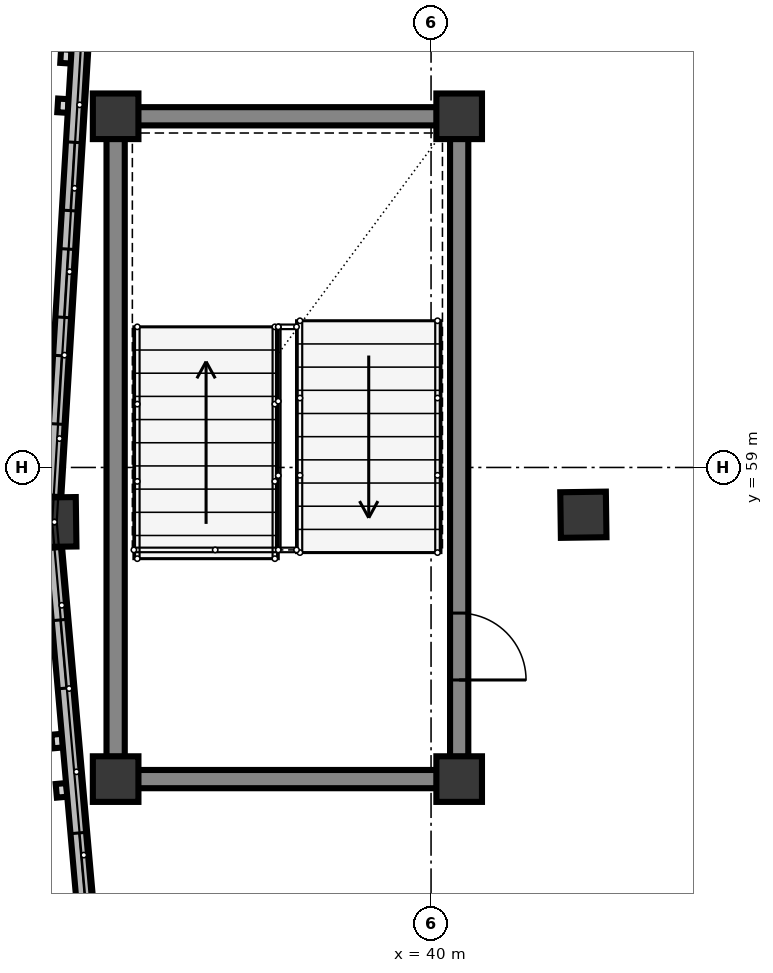
"""IFC4 building model, lengths in metres.
Left out: names, types, materials, properties, quantities, classifications, styles, units other than length and angle.
Written with IfcOpenShell. Run it as: python <this file> out.ifc"""

import sys

from ifc_helpers import new_model, si_unit, direction, frame, frame_2d, origin, origin_2d, place, context, subcontext, project, spatial, rectangle, extrude, element, fill, save


model = new_model("IFC4")
c1 = context("Model", 3, precision=1e-05, world=origin(), true_north=direction((0.0, 1.0)))
c2 = subcontext(c1, "Body", "Model", "MODEL_VIEW")
j1 = project(units=[si_unit("LENGTHUNIT", "METRE"), si_unit("PLANEANGLEUNIT", "RADIAN")], contexts=[c1])
p1 = place(None, origin())
s1 = spatial("IfcSite", under=j1, at=p1, CompositionType="ELEMENT")
p2 = place(p1, origin())
s2 = spatial("IfcBuilding", under=s1, at=p2, CompositionType="ELEMENT")
p3 = place(p2, frame((0.0, 0.0, 4.5)))
s3 = spatial("IfcBuildingStorey", under=s2, at=p3, CompositionType="ELEMENT", Elevation=4.5)
for number, where, z_axis, x_axis in (
    (1, (35.85, 54.9, 0.0), (0.0, 0.0, 1.0), (1.0, 0.0, 0.0)),
    (2, (40.37, 54.9, 0.0), (0.0, 0.0, 1.0), (1.0, 0.0, 0.0)),
    (3, (40.37, 63.62, 0.0), (0.0, 0.0, 1.0), (1.0, 0.0, 0.0)),
    (4, (35.85, 63.62, 0.0), (0.0, 0.0, 1.0), (1.0, 0.0, 0.0)),
    (5, (42.004, 58.378, 0.0), (0.0, 0.0, 1.0), (-1.0, -0.014, 0.0)),
):
    element("IfcColumn", number, at=place(p3, frame(where, z_axis=z_axis, x_axis=x_axis)), inside=s3, PredefinedType="COLUMN", context=c2, shape_type="SweptSolid", body=[
        extrude(rectangle(XDim=0.6, YDim=0.6, at=origin_2d()), origin(), (0.0, 0.0, 1.0), 4.0),
    ])
p4 = place(p3, frame((35.005, 58.281, 0.0), z_axis=(0.0, 0.0, 1.0), x_axis=(-0.999904463751, -0.013822567474, 0.0)))
e6 = element("IfcColumn", 6, at=p4, inside=s3, PredefinedType="COLUMN", context=c2, shape_type="SweptSolid", body=[
    extrude(rectangle(XDim=0.65, YDim=0.65, at=origin_2d()), origin(), (0.0, 0.0, 1.0), 4.0),
])
p5 = place(p3, frame((35.025, 58.616, 0.0), z_axis=(0.0, 0.0, 1.0), x_axis=(0.06029906372, 0.998180355905, 0.0)))
e7 = element("IfcWall", 7, at=p5, inside=s3, PredefinedType="SOLIDWALL", context=c2, shape_type="SweptSolid", body=[
    extrude(rectangle(XDim=7.033, YDim=0.22, at=frame_2d((3.516, 0.0))), origin(), (0.0, 0.0, 1.0), 3.172),
])
p6 = place(p5, frame((0.957, 0.0, 0.85)))
e8 = element("IfcOpeningElement", 8, at=p6, cuts=e7, PredefinedType="OPENING", context=c2, shape_type="SweptSolid", body=[
    extrude(rectangle(XDim=0.9, YDim=1.4, at=frame_2d((0.45, 0.7))), frame((0.0, 0.12, 0.0), z_axis=(0.0, -1.0, 0.0), x_axis=(1.0, 0.0, 0.0)), (0.0, 0.0, 1.0), 0.24),
])
p7 = place(p5, frame((2.363, 0.0, 0.85)))
e9 = element("IfcOpeningElement", 9, at=p7, cuts=e7, PredefinedType="OPENING", context=c2, shape_type="SweptSolid", body=[
    extrude(rectangle(XDim=0.9, YDim=1.4, at=frame_2d((0.45, 0.7))), frame((0.0, 0.12, 0.0), z_axis=(0.0, -1.0, 0.0), x_axis=(1.0, 0.0, 0.0)), (0.0, 0.0, 1.0), 0.24),
])
p8 = place(p5, frame((3.77, 0.0, 0.85)))
e10 = element("IfcOpeningElement", 10, at=p8, cuts=e7, PredefinedType="OPENING", context=c2, shape_type="SweptSolid", body=[
    extrude(rectangle(XDim=0.9, YDim=1.4, at=frame_2d((0.45, 0.7))), frame((0.0, 0.12, 0.0), z_axis=(0.0, -1.0, 0.0), x_axis=(1.0, 0.0, 0.0)), (0.0, 0.0, 1.0), 0.24),
])
p9 = place(p3, frame((35.652, 50.942, 0.0), z_axis=(0.0, 0.0, 1.0), x_axis=(-0.087777274836, 0.996140125696, 0.0)))
e11 = element("IfcWall", 11, at=p9, inside=s3, PredefinedType="SOLIDWALL", context=c2, shape_type="SweptSolid", body=[
    extrude(rectangle(XDim=7.031, YDim=0.22, at=frame_2d((3.516, 0.0))), origin(), (0.0, 0.0, 1.0), 3.172),
])
p10 = place(p9, frame((0.956, 0.0, 0.85)))
e12 = element("IfcOpeningElement", 12, at=p10, cuts=e11, PredefinedType="OPENING", context=c2, shape_type="SweptSolid", body=[
    extrude(rectangle(XDim=0.9, YDim=1.4, at=frame_2d((0.45, 0.7))), frame((0.0, 0.12, 0.0), z_axis=(0.0, -1.0, 0.0), x_axis=(1.0, 0.0, 0.0)), (0.0, 0.0, 1.0), 0.24),
])
p11 = place(p9, frame((2.362, 0.0, 0.85)))
e13 = element("IfcOpeningElement", 13, at=p11, cuts=e11, PredefinedType="OPENING", context=c2, shape_type="SweptSolid", body=[
    extrude(rectangle(XDim=0.9, YDim=1.4, at=frame_2d((0.45, 0.7))), frame((0.0, 0.12, 0.0), z_axis=(0.0, -1.0, 0.0), x_axis=(1.0, 0.0, 0.0)), (0.0, 0.0, 1.0), 0.24),
])
p12 = place(p9, frame((5.175, 0.0, 0.85)))
e14 = element("IfcOpeningElement", 14, at=p12, cuts=e11, PredefinedType="OPENING", context=c2, shape_type="SweptSolid", body=[
    extrude(rectangle(XDim=0.9, YDim=1.4, at=frame_2d((0.45, 0.7))), frame((0.0, 0.12, 0.0), z_axis=(0.0, -1.0, 0.0), x_axis=(1.0, 0.0, 0.0)), (0.0, 0.0, 1.0), 0.24),
])
p13 = place(p3, frame((35.85, 55.192, 0.0), z_axis=(0.0, 0.0, 1.0), x_axis=(0.0, 1.0, 0.0)))
e15 = element("IfcWall", 15, at=p13, inside=s3, PredefinedType="SHEAR", context=c2, shape_type="SweptSolid", body=[
    extrude(rectangle(XDim=8.136, YDim=0.24, at=frame_2d((4.068, 0.0))), origin(), (0.0, 0.0, 1.0), 3.74),
])
p14 = place(p3, frame((40.37, 63.328, 0.0), z_axis=(0.0, 0.0, 1.0), x_axis=(0.0, -1.0, 0.0)))
e16 = element("IfcWall", 16, at=p14, inside=s3, PredefinedType="SHEAR", context=c2, shape_type="SweptSolid", body=[
    extrude(rectangle(XDim=8.136, YDim=0.24, at=frame_2d((4.068, 0.0))), origin(), (0.0, 0.0, 1.0), 3.74),
])
p15 = place(p14, frame((6.244, 0.0, 0.0)))
e17 = element("IfcOpeningElement", 17, at=p15, cuts=e16, PredefinedType="OPENING", context=c2, shape_type="SweptSolid", body=[
    extrude(rectangle(XDim=0.88, YDim=2.1, at=frame_2d((0.44, 1.05))), frame((0.0, 0.13, 0.0), z_axis=(0.0, -1.0, 0.0), x_axis=(1.0, 0.0, 0.0)), (0.0, 0.0, 1.0), 0.26),
])
for number, where, z_axis, x_axis in (
    (18, (40.078, 54.9, 0.0), (0.0, 0.0, 1.0), (-1.0, 0.0, 0.0)),
    (19, (40.078, 63.62, 0.0), (0.0, 0.0, 1.0), (-1.0, 0.0, 0.0)),
):
    element("IfcWall", number, at=place(p3, frame(where, z_axis=z_axis, x_axis=x_axis)), inside=s3, PredefinedType="SHEAR", context=c2, shape_type="SweptSolid", body=[
        extrude(rectangle(XDim=3.936, YDim=0.24, at=frame_2d((1.968, 0.0))), origin(), (0.0, 0.0, 1.0), 3.74),
    ])
p16 = place(p6, origin())
e20 = element("IfcWindow", 20, at=p16, inside=s3, PartitioningType="SINGLE_PANEL", PredefinedType="WINDOW", context=c2, shape_type="SweptSolid", body=[
    extrude(rectangle(XDim=0.9, YDim=1.4, at=frame_2d((0.45, 0.7))), frame((0.0, 0.03, 0.0), z_axis=(0.0, -1.0, 0.0), x_axis=(1.0, 0.0, 0.0)), (0.0, 0.0, 1.0), 0.06),
])
fill(e8, e20)
p17 = place(p7, origin())
e21 = element("IfcWindow", 21, at=p17, inside=s3, PartitioningType="SINGLE_PANEL", PredefinedType="WINDOW", context=c2, shape_type="SweptSolid", body=[
    extrude(rectangle(XDim=0.9, YDim=1.4, at=frame_2d((0.45, 0.7))), frame((0.0, 0.03, 0.0), z_axis=(0.0, -1.0, 0.0), x_axis=(1.0, 0.0, 0.0)), (0.0, 0.0, 1.0), 0.06),
])
fill(e9, e21)
p18 = place(p8, origin())
e22 = element("IfcWindow", 22, at=p18, inside=s3, PartitioningType="SINGLE_PANEL", PredefinedType="WINDOW", context=c2, shape_type="SweptSolid", body=[
    extrude(rectangle(XDim=0.9, YDim=1.4, at=frame_2d((0.45, 0.7))), frame((0.0, 0.03, 0.0), z_axis=(0.0, -1.0, 0.0), x_axis=(1.0, 0.0, 0.0)), (0.0, 0.0, 1.0), 0.06),
])
fill(e10, e22)
p19 = place(p11, origin())
e23 = element("IfcWindow", 23, at=p19, inside=s3, PartitioningType="SINGLE_PANEL", PredefinedType="WINDOW", context=c2, shape_type="SweptSolid", body=[
    extrude(rectangle(XDim=0.9, YDim=1.4, at=frame_2d((0.45, 0.7))), frame((0.0, 0.03, 0.0), z_axis=(0.0, -1.0, 0.0), x_axis=(1.0, 0.0, 0.0)), (0.0, 0.0, 1.0), 0.06),
])
fill(e13, e23)
p20 = place(p12, origin())
e24 = element("IfcWindow", 24, at=p20, inside=s3, PartitioningType="SINGLE_PANEL", PredefinedType="WINDOW", context=c2, shape_type="SweptSolid", body=[
    extrude(rectangle(XDim=0.9, YDim=1.4, at=frame_2d((0.45, 0.7))), frame((0.0, 0.03, 0.0), z_axis=(0.0, -1.0, 0.0), x_axis=(1.0, 0.0, 0.0)), (0.0, 0.0, 1.0), 0.06),
])
fill(e14, e24)
p21 = place(p15, origin())
e25 = element("IfcDoor", 25, at=p21, inside=s3, OperationType="SINGLE_SWING_RIGHT", PredefinedType="DOOR", context=c2, shape_type="SweptSolid", body=[
    extrude(rectangle(XDim=0.88, YDim=2.1, at=frame_2d((0.44, 1.05))), frame((0.0, 0.025, 0.0), z_axis=(0.0, -1.0, 0.0), x_axis=(1.0, 0.0, 0.0)), (0.0, 0.0, 1.0), 0.05),
])
fill(e17, e25)
save(model, sys.argv[1])
